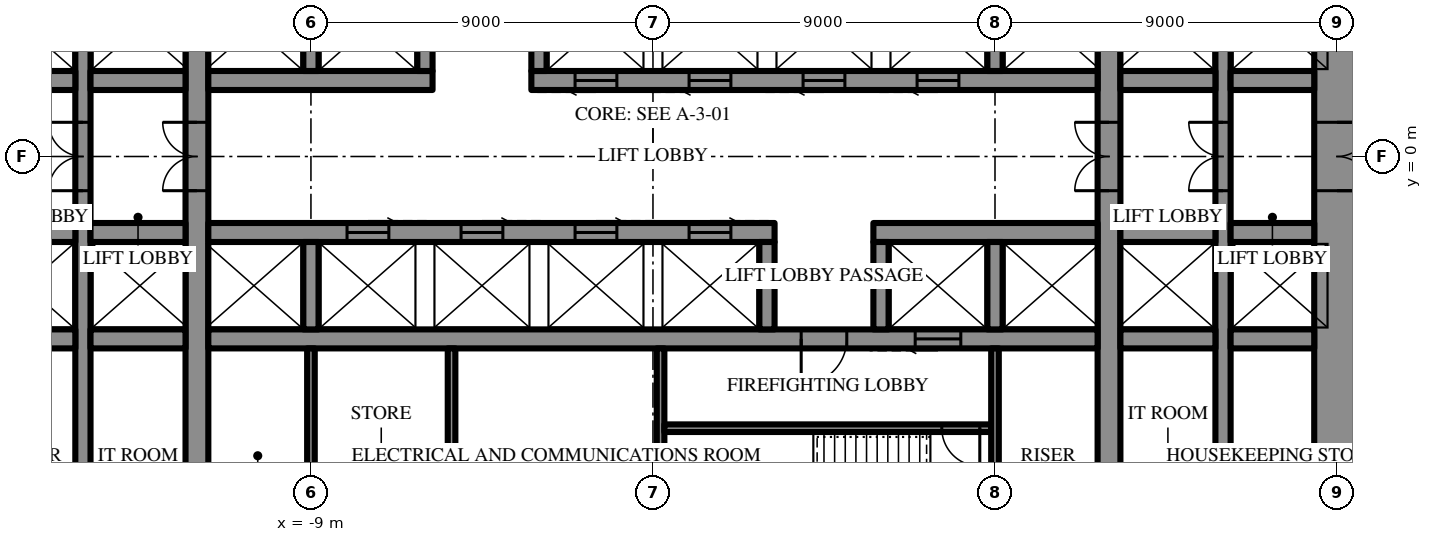
"""IFC4 building model, lengths in metres.
Left out: names, types, materials, properties, quantities, classifications, styles, units other than length and angle.
Written with IfcOpenShell. Run it as: python <this file> out.ifc"""

import sys

from ifc_helpers import new_model, si_unit, direction, frame, frame_2d, origin, place, context, subcontext, project, spatial, rectangle, extrude, element, fill, save


model = new_model("IFC4")
c1 = context("Model", 3, precision=1e-05, world=origin(), true_north=direction((0.0, 1.0)))
c2 = subcontext(c1, "Body", "Model", "MODEL_VIEW")
j1 = project(units=[si_unit("LENGTHUNIT", "METRE"), si_unit("PLANEANGLEUNIT", "RADIAN")], contexts=[c1])
p1 = place(None, origin())
s1 = spatial("IfcSite", under=j1, at=p1, CompositionType="ELEMENT")
p2 = place(p1, origin())
s2 = spatial("IfcBuilding", under=s1, at=p2, CompositionType="ELEMENT")
p3 = place(p2, frame((0.0, 0.0, 69.7)))
s3 = spatial("IfcBuildingStorey", under=s2, at=p3, CompositionType="ELEMENT", Elevation=69.7)
p4 = place(p3, frame((18.0, -10.7, 0.0), z_axis=(0.0, 0.0, 1.0), x_axis=(0.0, 1.0, 0.0)))
e1 = element("IfcWall", 1, at=p4, inside=s3, PredefinedType="SHEAR", context=c2, shape_type="SweptSolid", body=[
    extrude(rectangle(XDim=21.4, YDim=1.2, at=frame_2d((10.7, 0.0))), origin(), (0.0, 0.0, 1.0), 4.2),
])
p5 = place(p4, frame((9.8, 0.0, 0.0)))
e2 = element("IfcOpeningElement", 2, at=p5, cuts=e1, PredefinedType="OPENING", context=c2, shape_type="SweptSolid", body=[
    extrude(rectangle(XDim=1.8, YDim=2.4, at=frame_2d((0.9, 1.2))), frame((0.0, 0.61, 0.0), z_axis=(0.0, -1.0, 0.0), x_axis=(1.0, 0.0, 0.0)), (0.0, 0.0, 1.0), 1.22),
])
p6 = place(p3, frame((12.0, -10.7, 0.0), z_axis=(0.0, 0.0, 1.0), x_axis=(0.0, 1.0, 0.0)))
e3 = element("IfcWall", 3, at=p6, inside=s3, PredefinedType="SHEAR", context=c2, shape_type="SweptSolid", body=[
    extrude(rectangle(XDim=21.4, YDim=0.6, at=frame_2d((10.7, 0.0))), origin(), (0.0, 0.0, 1.0), 4.2),
])
p7 = place(p6, frame((9.8, 0.0, 0.0)))
e4 = element("IfcOpeningElement", 4, at=p7, cuts=e3, PredefinedType="OPENING", context=c2, shape_type="SweptSolid", body=[
    extrude(rectangle(XDim=1.8, YDim=2.4, at=frame_2d((0.9, 1.2))), frame((0.0, 0.31, 0.0), z_axis=(0.0, -1.0, 0.0), x_axis=(1.0, 0.0, 0.0)), (0.0, 0.0, 1.0), 0.62),
])
p8 = place(p3, frame((-12.0, -10.7, 0.0), z_axis=(0.0, 0.0, 1.0), x_axis=(0.0, 1.0, 0.0)))
e5 = element("IfcWall", 5, at=p8, inside=s3, PredefinedType="SHEAR", context=c2, shape_type="SweptSolid", body=[
    extrude(rectangle(XDim=21.4, YDim=0.6, at=frame_2d((10.7, 0.0))), origin(), (0.0, 0.0, 1.0), 4.2),
])
p9 = place(p8, frame((9.8, 0.0, 0.0)))
e6 = element("IfcOpeningElement", 6, at=p9, cuts=e5, PredefinedType="OPENING", context=c2, shape_type="SweptSolid", body=[
    extrude(rectangle(XDim=1.8, YDim=2.4, at=frame_2d((0.9, 1.2))), frame((0.0, 0.31, 0.0), z_axis=(0.0, -1.0, 0.0), x_axis=(1.0, 0.0, 0.0)), (0.0, 0.0, 1.0), 0.62),
])
p10 = place(p3, frame((15.0, -10.7, 0.0), z_axis=(0.0, 0.0, 1.0), x_axis=(0.0, 1.0, 0.0)))
e7 = element("IfcWall", 7, at=p10, inside=s3, PredefinedType="SHEAR", context=c2, shape_type="SweptSolid", body=[
    extrude(rectangle(XDim=21.4, YDim=0.4, at=frame_2d((10.7, 0.0))), origin(), (0.0, 0.0, 1.0), 4.2),
])
p11 = place(p10, frame((9.8, 0.0, 0.0)))
e8 = element("IfcOpeningElement", 8, at=p11, cuts=e7, PredefinedType="OPENING", context=c2, shape_type="SweptSolid", body=[
    extrude(rectangle(XDim=1.8, YDim=2.4, at=frame_2d((0.9, 1.2))), frame((0.0, 0.21, 0.0), z_axis=(0.0, -1.0, 0.0), x_axis=(1.0, 0.0, 0.0)), (0.0, 0.0, 1.0), 0.42),
])
p12 = place(p3, frame((-15.0, -10.7, 0.0), z_axis=(0.0, 0.0, 1.0), x_axis=(0.0, 1.0, 0.0)))
e9 = element("IfcWall", 9, at=p12, inside=s3, PredefinedType="SHEAR", context=c2, shape_type="SweptSolid", body=[
    extrude(rectangle(XDim=21.4, YDim=0.4, at=frame_2d((10.7, 0.0))), origin(), (0.0, 0.0, 1.0), 4.2),
])
p13 = place(p12, frame((9.8, 0.0, 0.0)))
e10 = element("IfcOpeningElement", 10, at=p13, cuts=e9, PredefinedType="OPENING", context=c2, shape_type="SweptSolid", body=[
    extrude(rectangle(XDim=1.8, YDim=2.4, at=frame_2d((0.9, 1.2))), frame((0.0, 0.21, 0.0), z_axis=(0.0, -1.0, 0.0), x_axis=(1.0, 0.0, 0.0)), (0.0, 0.0, 1.0), 0.42),
])
p14 = place(p3, frame((-17.4, 2.0, 0.0), z_axis=(0.0, 0.0, 1.0), x_axis=(1.0, 0.0, 0.0)))
e11 = element("IfcWall", 11, at=p14, inside=s3, PredefinedType="SHEAR", context=c2, shape_type="SweptSolid", body=[
    extrude(rectangle(XDim=2.2, YDim=0.5, at=frame_2d((1.1, 0.0))), origin(), (0.0, 0.0, 1.0), 4.2),
])
p15 = place(p3, frame((-14.8, 2.0, 0.0), z_axis=(0.0, 0.0, 1.0), x_axis=(1.0, 0.0, 0.0)))
e12 = element("IfcWall", 12, at=p15, inside=s3, PredefinedType="SHEAR", context=c2, shape_type="SweptSolid", body=[
    extrude(rectangle(XDim=2.5, YDim=0.5, at=frame_2d((1.25, 0.0))), origin(), (0.0, 0.0, 1.0), 4.2),
])
p16 = place(p3, frame((-11.7, 2.0, 0.0), z_axis=(0.0, 0.0, 1.0), x_axis=(1.0, 0.0, 0.0)))
e13 = element("IfcWall", 13, at=p16, inside=s3, PredefinedType="SHEAR", context=c2, shape_type="SweptSolid", body=[
    extrude(rectangle(XDim=5.9, YDim=0.5, at=frame_2d((2.95, 0.0))), origin(), (0.0, 0.0, 1.0), 4.2),
])
p17 = place(p3, frame((-3.2, 2.0, 0.0), z_axis=(0.0, 0.0, 1.0), x_axis=(1.0, 0.0, 0.0)))
e14 = element("IfcWall", 14, at=p17, inside=s3, PredefinedType="SHEAR", context=c2, shape_type="SweptSolid", body=[
    extrude(rectangle(XDim=14.9, YDim=0.5, at=frame_2d((7.45, 0.0))), origin(), (0.0, 0.0, 1.0), 4.2),
])
p18 = place(p17, frame((1.15, 0.0, 0.0)))
e15 = element("IfcOpeningElement", 15, at=p18, cuts=e14, PredefinedType="OPENING", context=c2, shape_type="SweptSolid", body=[
    extrude(rectangle(XDim=1.1, YDim=2.2, at=frame_2d((0.55, 1.1))), frame((0.0, 0.26, 0.0), z_axis=(0.0, -1.0, 0.0), x_axis=(1.0, 0.0, 0.0)), (0.0, 0.0, 1.0), 0.52),
])
p19 = place(p17, frame((4.15, 0.0, 0.0)))
e16 = element("IfcOpeningElement", 16, at=p19, cuts=e14, PredefinedType="OPENING", context=c2, shape_type="SweptSolid", body=[
    extrude(rectangle(XDim=1.1, YDim=2.2, at=frame_2d((0.55, 1.1))), frame((0.0, 0.26, 0.0), z_axis=(0.0, -1.0, 0.0), x_axis=(1.0, 0.0, 0.0)), (0.0, 0.0, 1.0), 0.52),
])
p20 = place(p17, frame((7.15, 0.0, 0.0)))
e17 = element("IfcOpeningElement", 17, at=p20, cuts=e14, PredefinedType="OPENING", context=c2, shape_type="SweptSolid", body=[
    extrude(rectangle(XDim=1.1, YDim=2.2, at=frame_2d((0.55, 1.1))), frame((0.0, 0.26, 0.0), z_axis=(0.0, -1.0, 0.0), x_axis=(1.0, 0.0, 0.0)), (0.0, 0.0, 1.0), 0.52),
])
p21 = place(p17, frame((10.15, 0.0, 0.0)))
e18 = element("IfcOpeningElement", 18, at=p21, cuts=e14, PredefinedType="OPENING", context=c2, shape_type="SweptSolid", body=[
    extrude(rectangle(XDim=1.1, YDim=2.2, at=frame_2d((0.55, 1.1))), frame((0.0, 0.26, 0.0), z_axis=(0.0, -1.0, 0.0), x_axis=(1.0, 0.0, 0.0)), (0.0, 0.0, 1.0), 0.52),
])
p22 = place(p3, frame((12.3, 2.0, 0.0), z_axis=(0.0, 0.0, 1.0), x_axis=(1.0, 0.0, 0.0)))
e19 = element("IfcWall", 19, at=p22, inside=s3, PredefinedType="SHEAR", context=c2, shape_type="SweptSolid", body=[
    extrude(rectangle(XDim=2.5, YDim=0.5, at=frame_2d((1.25, 0.0))), origin(), (0.0, 0.0, 1.0), 4.2),
])
p23 = place(p3, frame((15.2, 2.0, 0.0), z_axis=(0.0, 0.0, 1.0), x_axis=(1.0, 0.0, 0.0)))
e20 = element("IfcWall", 20, at=p23, inside=s3, PredefinedType="SHEAR", context=c2, shape_type="SweptSolid", body=[
    extrude(rectangle(XDim=2.2, YDim=0.5, at=frame_2d((1.1, 0.0))), origin(), (0.0, 0.0, 1.0), 4.2),
])
for number, where, z_axis, x_axis in (
    (21, (-9.0, 2.25, 0.0), (0.0, 0.0, 1.0), (0.0, 1.0, 0.0)),
    (22, (-6.0, 2.25, 0.0), (0.0, 0.0, 1.0), (0.0, 1.0, 0.0)),
    (23, (-3.0, 2.25, 0.0), (0.0, 0.0, 1.0), (0.0, 1.0, 0.0)),
    (24, (9.0, 2.25, 0.0), (0.0, 0.0, 1.0), (0.0, 1.0, 0.0)),
):
    element("IfcWall", number, at=place(p3, frame(where, z_axis=z_axis, x_axis=x_axis)), inside=s3, PredefinedType="SHEAR", context=c2, shape_type="SweptSolid", body=[
        extrude(rectangle(XDim=2.3, YDim=0.4, at=frame_2d((1.15, 0.0))), origin(), (0.0, 0.0, 1.0), 4.2),
    ])
p24 = place(p3, frame((17.4, -2.0, 0.0), z_axis=(0.0, 0.0, 1.0), x_axis=(-1.0, 0.0, 0.0)))
e25 = element("IfcWall", 25, at=p24, inside=s3, PredefinedType="SHEAR", context=c2, shape_type="SweptSolid", body=[
    extrude(rectangle(XDim=2.2, YDim=0.5, at=frame_2d((1.1, 0.0))), origin(), (0.0, 0.0, 1.0), 4.2),
])
p25 = place(p3, frame((14.8, -2.0, 0.0), z_axis=(0.0, 0.0, 1.0), x_axis=(-1.0, 0.0, 0.0)))
e26 = element("IfcWall", 26, at=p25, inside=s3, PredefinedType="SHEAR", context=c2, shape_type="SweptSolid", body=[
    extrude(rectangle(XDim=2.5, YDim=0.5, at=frame_2d((1.25, 0.0))), origin(), (0.0, 0.0, 1.0), 4.2),
])
p26 = place(p3, frame((11.7, -2.0, 0.0), z_axis=(0.0, 0.0, 1.0), x_axis=(-1.0, 0.0, 0.0)))
e27 = element("IfcWall", 27, at=p26, inside=s3, PredefinedType="SHEAR", context=c2, shape_type="SweptSolid", body=[
    extrude(rectangle(XDim=5.9, YDim=0.5, at=frame_2d((2.95, 0.0))), origin(), (0.0, 0.0, 1.0), 4.2),
])
p27 = place(p3, frame((3.2, -2.0, 0.0), z_axis=(0.0, 0.0, 1.0), x_axis=(-1.0, 0.0, 0.0)))
e28 = element("IfcWall", 28, at=p27, inside=s3, PredefinedType="SHEAR", context=c2, shape_type="SweptSolid", body=[
    extrude(rectangle(XDim=14.9, YDim=0.5, at=frame_2d((7.45, 0.0))), origin(), (0.0, 0.0, 1.0), 4.2),
])
p28 = place(p27, frame((1.15, 0.0, 0.0)))
e29 = element("IfcOpeningElement", 29, at=p28, cuts=e28, PredefinedType="OPENING", context=c2, shape_type="SweptSolid", body=[
    extrude(rectangle(XDim=1.1, YDim=2.2, at=frame_2d((0.55, 1.1))), frame((0.0, 0.26, 0.0), z_axis=(0.0, -1.0, 0.0), x_axis=(1.0, 0.0, 0.0)), (0.0, 0.0, 1.0), 0.52),
])
p29 = place(p27, frame((4.15, 0.0, 0.0)))
e30 = element("IfcOpeningElement", 30, at=p29, cuts=e28, PredefinedType="OPENING", context=c2, shape_type="SweptSolid", body=[
    extrude(rectangle(XDim=1.1, YDim=2.2, at=frame_2d((0.55, 1.1))), frame((0.0, 0.26, 0.0), z_axis=(0.0, -1.0, 0.0), x_axis=(1.0, 0.0, 0.0)), (0.0, 0.0, 1.0), 0.52),
])
p30 = place(p27, frame((7.15, 0.0, 0.0)))
e31 = element("IfcOpeningElement", 31, at=p30, cuts=e28, PredefinedType="OPENING", context=c2, shape_type="SweptSolid", body=[
    extrude(rectangle(XDim=1.1, YDim=2.2, at=frame_2d((0.55, 1.1))), frame((0.0, 0.26, 0.0), z_axis=(0.0, -1.0, 0.0), x_axis=(1.0, 0.0, 0.0)), (0.0, 0.0, 1.0), 0.52),
])
p31 = place(p27, frame((10.15, 0.0, 0.0)))
e32 = element("IfcOpeningElement", 32, at=p31, cuts=e28, PredefinedType="OPENING", context=c2, shape_type="SweptSolid", body=[
    extrude(rectangle(XDim=1.1, YDim=2.2, at=frame_2d((0.55, 1.1))), frame((0.0, 0.26, 0.0), z_axis=(0.0, -1.0, 0.0), x_axis=(1.0, 0.0, 0.0)), (0.0, 0.0, 1.0), 0.52),
])
p32 = place(p3, frame((-12.3, -2.0, 0.0), z_axis=(0.0, 0.0, 1.0), x_axis=(-1.0, 0.0, 0.0)))
e33 = element("IfcWall", 33, at=p32, inside=s3, PredefinedType="SHEAR", context=c2, shape_type="SweptSolid", body=[
    extrude(rectangle(XDim=2.5, YDim=0.5, at=frame_2d((1.25, 0.0))), origin(), (0.0, 0.0, 1.0), 4.2),
])
for number, where, z_axis, x_axis in (
    (34, (-15.2, -2.0, 0.0), (0.0, 0.0, 1.0), (-1.0, 0.0, 0.0)),
    (35, (17.4, -4.8, 0.0), (0.0, 0.0, 1.0), (-1.0, 0.0, 0.0)),
):
    element("IfcWall", number, at=place(p3, frame(where, z_axis=z_axis, x_axis=x_axis)), inside=s3, PredefinedType="SHEAR", context=c2, shape_type="SweptSolid", body=[
        extrude(rectangle(XDim=2.2, YDim=0.5, at=frame_2d((1.1, 0.0))), origin(), (0.0, 0.0, 1.0), 4.2),
    ])
p33 = place(p3, frame((14.8, -4.8, 0.0), z_axis=(0.0, 0.0, 1.0), x_axis=(-1.0, 0.0, 0.0)))
e36 = element("IfcWall", 36, at=p33, inside=s3, PredefinedType="SHEAR", context=c2, shape_type="SweptSolid", body=[
    extrude(rectangle(XDim=2.5, YDim=0.5, at=frame_2d((1.25, 0.0))), origin(), (0.0, 0.0, 1.0), 4.2),
])
p34 = place(p3, frame((11.7, -4.8, 0.0), z_axis=(0.0, 0.0, 1.0), x_axis=(-1.0, 0.0, 0.0)))
e37 = element("IfcWall", 37, at=p34, inside=s3, PredefinedType="SHEAR", context=c2, shape_type="SweptSolid", body=[
    extrude(rectangle(XDim=23.4, YDim=0.5, at=frame_2d((11.7, 0.0))), origin(), (0.0, 0.0, 1.0), 4.2),
])
p35 = place(p34, frame((6.6, 0.0, 0.0)))
e38 = element("IfcOpeningElement", 38, at=p35, cuts=e37, PredefinedType="OPENING", context=c2, shape_type="SweptSolid", body=[
    extrude(rectangle(XDim=1.2, YDim=2.2, at=frame_2d((0.6, 1.1))), frame((0.0, 0.26, 0.0), z_axis=(0.0, -1.0, 0.0), x_axis=(1.0, 0.0, 0.0)), (0.0, 0.0, 1.0), 0.52),
])
p36 = place(p34, frame((3.6, 0.0, 0.0)))
e39 = element("IfcOpeningElement", 39, at=p36, cuts=e37, PredefinedType="OPENING", context=c2, shape_type="SweptSolid", body=[
    extrude(rectangle(XDim=1.2, YDim=2.2, at=frame_2d((0.6, 1.1))), frame((0.0, 0.26, 0.0), z_axis=(0.0, -1.0, 0.0), x_axis=(1.0, 0.0, 0.0)), (0.0, 0.0, 1.0), 0.52),
])
p37 = place(p3, frame((-12.3, -4.8, 0.0), z_axis=(0.0, 0.0, 1.0), x_axis=(-1.0, 0.0, 0.0)))
e40 = element("IfcWall", 40, at=p37, inside=s3, PredefinedType="SHEAR", context=c2, shape_type="SweptSolid", body=[
    extrude(rectangle(XDim=2.5, YDim=0.5, at=frame_2d((1.25, 0.0))), origin(), (0.0, 0.0, 1.0), 4.2),
])
p38 = place(p3, frame((-15.2, -4.8, 0.0), z_axis=(0.0, 0.0, 1.0), x_axis=(-1.0, 0.0, 0.0)))
e41 = element("IfcWall", 41, at=p38, inside=s3, PredefinedType="SHEAR", context=c2, shape_type="SweptSolid", body=[
    extrude(rectangle(XDim=2.2, YDim=0.5, at=frame_2d((1.1, 0.0))), origin(), (0.0, 0.0, 1.0), 4.2),
])
for number, where, z_axis, x_axis in (
    (42, (9.0, -2.25, 0.0), (0.0, 0.0, 1.0), (0.0, -1.0, 0.0)),
    (43, (6.0, -2.25, 0.0), (0.0, 0.0, 1.0), (0.0, -1.0, 0.0)),
    (44, (3.0, -2.25, 0.0), (0.0, 0.0, 1.0), (0.0, -1.0, 0.0)),
    (45, (-9.0, -2.25, 0.0), (0.0, 0.0, 1.0), (0.0, -1.0, 0.0)),
):
    element("IfcWall", number, at=place(p3, frame(where, z_axis=z_axis, x_axis=x_axis)), inside=s3, PredefinedType="SHEAR", context=c2, shape_type="SweptSolid", body=[
        extrude(rectangle(XDim=2.3, YDim=0.4, at=frame_2d((1.15, 0.0))), origin(), (0.0, 0.0, 1.0), 4.2),
    ])
p39 = place(p3, frame((0.2, -5.05, 0.0), z_axis=(0.0, 0.0, 1.0), x_axis=(0.0, -1.0, 0.0)))
e46 = element("IfcWall", 46, at=p39, inside=s3, PredefinedType="SHEAR", context=c2, shape_type="SweptSolid", body=[
    extrude(rectangle(XDim=5.65, YDim=0.2, at=frame_2d((2.825, 0.0))), origin(), (0.0, 0.0, 1.0), 4.2),
])
p40 = place(p3, frame((8.9, -7.15, 0.0), z_axis=(0.0, 0.0, 1.0), x_axis=(-1.0, 0.0, 0.0)))
e47 = element("IfcWall", 47, at=p40, inside=s3, PredefinedType="SHEAR", context=c2, shape_type="SweptSolid", body=[
    extrude(rectangle(XDim=8.6, YDim=0.2, at=frame_2d((4.3, 0.0))), origin(), (0.0, 0.0, 1.0), 4.2),
])
p41 = place(p40, frame((0.3, 0.0, 0.0)))
e48 = element("IfcOpeningElement", 48, at=p41, cuts=e47, PredefinedType="OPENING", context=c2, shape_type="SweptSolid", body=[
    extrude(rectangle(XDim=1.0, YDim=2.2, at=frame_2d((0.5, 1.1))), frame((0.0, 0.11, 0.0), z_axis=(0.0, -1.0, 0.0), x_axis=(1.0, 0.0, 0.0)), (0.0, 0.0, 1.0), 0.22),
])
for number, where, z_axis, x_axis in (
    (49, (9.0, -5.05, 0.0), (0.0, 0.0, 1.0), (0.0, -1.0, 0.0)),
    (50, (-9.0, -5.05, 0.0), (0.0, 0.0, 1.0), (0.0, -1.0, 0.0)),
    (51, (-5.3, -5.05, 0.0), (0.0, 0.0, 1.0), (0.0, -1.0, 0.0)),
):
    element("IfcWall", number, at=place(p3, frame(where, z_axis=z_axis, x_axis=x_axis)), inside=s3, PredefinedType="PARTITIONING", context=c2, shape_type="SweptSolid", body=[
        extrude(rectangle(XDim=5.65, YDim=0.2, at=frame_2d((2.825, 0.0))), origin(), (0.0, 0.0, 1.0), 4.0),
    ])
p42 = place(p5, frame((1.8, 0.0, 0.0), z_axis=(0.0, 0.0, 1.0), x_axis=(-1.0, 0.0, 0.0)))
e52 = element("IfcDoor", 52, at=p42, inside=s3, OperationType="DOUBLE_DOOR_SINGLE_SWING", PredefinedType="DOOR", context=c2, shape_type="SweptSolid", body=[
    extrude(rectangle(XDim=1.8, YDim=2.4, at=frame_2d((0.9, 1.2))), frame((0.0, 0.025, 0.0), z_axis=(0.0, -1.0, 0.0), x_axis=(1.0, 0.0, 0.0)), (0.0, 0.0, 1.0), 0.05),
])
fill(e2, e52)
p43 = place(p35, origin())
e53 = element("IfcDoor", 53, at=p43, inside=s3, OperationType="SINGLE_SWING_LEFT", PredefinedType="DOOR", context=c2, shape_type="SweptSolid", body=[
    extrude(rectangle(XDim=1.2, YDim=2.2, at=frame_2d((0.6, 1.1))), frame((0.0, 0.025, 0.0), z_axis=(0.0, -1.0, 0.0), x_axis=(1.0, 0.0, 0.0)), (0.0, 0.0, 1.0), 0.05),
])
fill(e38, e53)
p44 = place(p41, origin())
e54 = element("IfcDoor", 54, at=p44, inside=s3, OperationType="SINGLE_SWING_RIGHT", PredefinedType="DOOR", context=c2, shape_type="SweptSolid", body=[
    extrude(rectangle(XDim=1.0, YDim=2.2, at=frame_2d((0.5, 1.1))), frame((0.0, 0.025, 0.0), z_axis=(0.0, -1.0, 0.0), x_axis=(1.0, 0.0, 0.0)), (0.0, 0.0, 1.0), 0.05),
])
fill(e48, e54)
p45 = place(p7, origin())
e55 = element("IfcDoor", 55, at=p45, inside=s3, OperationType="DOUBLE_DOOR_SINGLE_SWING", PredefinedType="DOOR", context=c2, shape_type="SweptSolid", body=[
    extrude(rectangle(XDim=1.8, YDim=2.4, at=frame_2d((0.9, 1.2))), frame((0.0, 0.025, 0.0), z_axis=(0.0, -1.0, 0.0), x_axis=(1.0, 0.0, 0.0)), (0.0, 0.0, 1.0), 0.05),
])
fill(e4, e55)
p46 = place(p9, origin())
e56 = element("IfcDoor", 56, at=p46, inside=s3, OperationType="DOUBLE_DOOR_SINGLE_SWING", PredefinedType="DOOR", context=c2, shape_type="SweptSolid", body=[
    extrude(rectangle(XDim=1.8, YDim=2.4, at=frame_2d((0.9, 1.2))), frame((0.0, 0.025, 0.0), z_axis=(0.0, -1.0, 0.0), x_axis=(1.0, 0.0, 0.0)), (0.0, 0.0, 1.0), 0.05),
])
fill(e6, e56)
p47 = place(p11, origin())
e57 = element("IfcDoor", 57, at=p47, inside=s3, OperationType="DOUBLE_DOOR_SINGLE_SWING", PredefinedType="DOOR", context=c2, shape_type="SweptSolid", body=[
    extrude(rectangle(XDim=1.8, YDim=2.4, at=frame_2d((0.9, 1.2))), frame((0.0, 0.025, 0.0), z_axis=(0.0, -1.0, 0.0), x_axis=(1.0, 0.0, 0.0)), (0.0, 0.0, 1.0), 0.05),
])
fill(e8, e57)
p48 = place(p13, origin())
e58 = element("IfcDoor", 58, at=p48, inside=s3, OperationType="DOUBLE_DOOR_SINGLE_SWING", PredefinedType="DOOR", context=c2, shape_type="SweptSolid", body=[
    extrude(rectangle(XDim=1.8, YDim=2.4, at=frame_2d((0.9, 1.2))), frame((0.0, 0.025, 0.0), z_axis=(0.0, -1.0, 0.0), x_axis=(1.0, 0.0, 0.0)), (0.0, 0.0, 1.0), 0.05),
])
fill(e10, e58)
p49 = place(p18, frame((1.1, 0.0, 0.0), z_axis=(0.0, 0.0, 1.0), x_axis=(-1.0, 0.0, 0.0)))
e59 = element("IfcDoor", 59, at=p49, inside=s3, OperationType="SLIDING_TO_LEFT", PredefinedType="DOOR", context=c2, shape_type="SweptSolid", body=[
    extrude(rectangle(XDim=1.1, YDim=2.2, at=frame_2d((0.55, 1.1))), frame((0.0, 0.025, 0.0), z_axis=(0.0, -1.0, 0.0), x_axis=(1.0, 0.0, 0.0)), (0.0, 0.0, 1.0), 0.05),
])
fill(e15, e59)
p50 = place(p19, frame((1.1, 0.0, 0.0), z_axis=(0.0, 0.0, 1.0), x_axis=(-1.0, 0.0, 0.0)))
e60 = element("IfcDoor", 60, at=p50, inside=s3, OperationType="SLIDING_TO_LEFT", PredefinedType="DOOR", context=c2, shape_type="SweptSolid", body=[
    extrude(rectangle(XDim=1.1, YDim=2.2, at=frame_2d((0.55, 1.1))), frame((0.0, 0.025, 0.0), z_axis=(0.0, -1.0, 0.0), x_axis=(1.0, 0.0, 0.0)), (0.0, 0.0, 1.0), 0.05),
])
fill(e16, e60)
p51 = place(p20, frame((1.1, 0.0, 0.0), z_axis=(0.0, 0.0, 1.0), x_axis=(-1.0, 0.0, 0.0)))
e61 = element("IfcDoor", 61, at=p51, inside=s3, OperationType="SLIDING_TO_LEFT", PredefinedType="DOOR", context=c2, shape_type="SweptSolid", body=[
    extrude(rectangle(XDim=1.1, YDim=2.2, at=frame_2d((0.55, 1.1))), frame((0.0, 0.025, 0.0), z_axis=(0.0, -1.0, 0.0), x_axis=(1.0, 0.0, 0.0)), (0.0, 0.0, 1.0), 0.05),
])
fill(e17, e61)
p52 = place(p21, frame((1.1, 0.0, 0.0), z_axis=(0.0, 0.0, 1.0), x_axis=(-1.0, 0.0, 0.0)))
e62 = element("IfcDoor", 62, at=p52, inside=s3, OperationType="SLIDING_TO_LEFT", PredefinedType="DOOR", context=c2, shape_type="SweptSolid", body=[
    extrude(rectangle(XDim=1.1, YDim=2.2, at=frame_2d((0.55, 1.1))), frame((0.0, 0.025, 0.0), z_axis=(0.0, -1.0, 0.0), x_axis=(1.0, 0.0, 0.0)), (0.0, 0.0, 1.0), 0.05),
])
fill(e18, e62)
p53 = place(p36, origin())
e63 = element("IfcDoor", 63, at=p53, inside=s3, OperationType="SLIDING_TO_LEFT", PredefinedType="DOOR", context=c2, shape_type="SweptSolid", body=[
    extrude(rectangle(XDim=1.2, YDim=2.2, at=frame_2d((0.6, 1.1))), frame((0.0, 0.025, 0.0), z_axis=(0.0, -1.0, 0.0), x_axis=(1.0, 0.0, 0.0)), (0.0, 0.0, 1.0), 0.05),
])
fill(e39, e63)
p54 = place(p28, frame((1.1, 0.0, 0.0), z_axis=(0.0, 0.0, 1.0), x_axis=(-1.0, 0.0, 0.0)))
e64 = element("IfcDoor", 64, at=p54, inside=s3, OperationType="SLIDING_TO_LEFT", PredefinedType="DOOR", context=c2, shape_type="SweptSolid", body=[
    extrude(rectangle(XDim=1.1, YDim=2.2, at=frame_2d((0.55, 1.1))), frame((0.0, 0.025, 0.0), z_axis=(0.0, -1.0, 0.0), x_axis=(1.0, 0.0, 0.0)), (0.0, 0.0, 1.0), 0.05),
])
fill(e29, e64)
p55 = place(p29, frame((1.1, 0.0, 0.0), z_axis=(0.0, 0.0, 1.0), x_axis=(-1.0, 0.0, 0.0)))
e65 = element("IfcDoor", 65, at=p55, inside=s3, OperationType="SLIDING_TO_LEFT", PredefinedType="DOOR", context=c2, shape_type="SweptSolid", body=[
    extrude(rectangle(XDim=1.1, YDim=2.2, at=frame_2d((0.55, 1.1))), frame((0.0, 0.025, 0.0), z_axis=(0.0, -1.0, 0.0), x_axis=(1.0, 0.0, 0.0)), (0.0, 0.0, 1.0), 0.05),
])
fill(e30, e65)
p56 = place(p30, frame((1.1, 0.0, 0.0), z_axis=(0.0, 0.0, 1.0), x_axis=(-1.0, 0.0, 0.0)))
e66 = element("IfcDoor", 66, at=p56, inside=s3, OperationType="SLIDING_TO_LEFT", PredefinedType="DOOR", context=c2, shape_type="SweptSolid", body=[
    extrude(rectangle(XDim=1.1, YDim=2.2, at=frame_2d((0.55, 1.1))), frame((0.0, 0.025, 0.0), z_axis=(0.0, -1.0, 0.0), x_axis=(1.0, 0.0, 0.0)), (0.0, 0.0, 1.0), 0.05),
])
fill(e31, e66)
p57 = place(p31, frame((1.1, 0.0, 0.0), z_axis=(0.0, 0.0, 1.0), x_axis=(-1.0, 0.0, 0.0)))
e67 = element("IfcDoor", 67, at=p57, inside=s3, OperationType="SLIDING_TO_LEFT", PredefinedType="DOOR", context=c2, shape_type="SweptSolid", body=[
    extrude(rectangle(XDim=1.1, YDim=2.2, at=frame_2d((0.55, 1.1))), frame((0.0, 0.025, 0.0), z_axis=(0.0, -1.0, 0.0), x_axis=(1.0, 0.0, 0.0)), (0.0, 0.0, 1.0), 0.05),
])
fill(e32, e67)
save(model, sys.argv[1])
